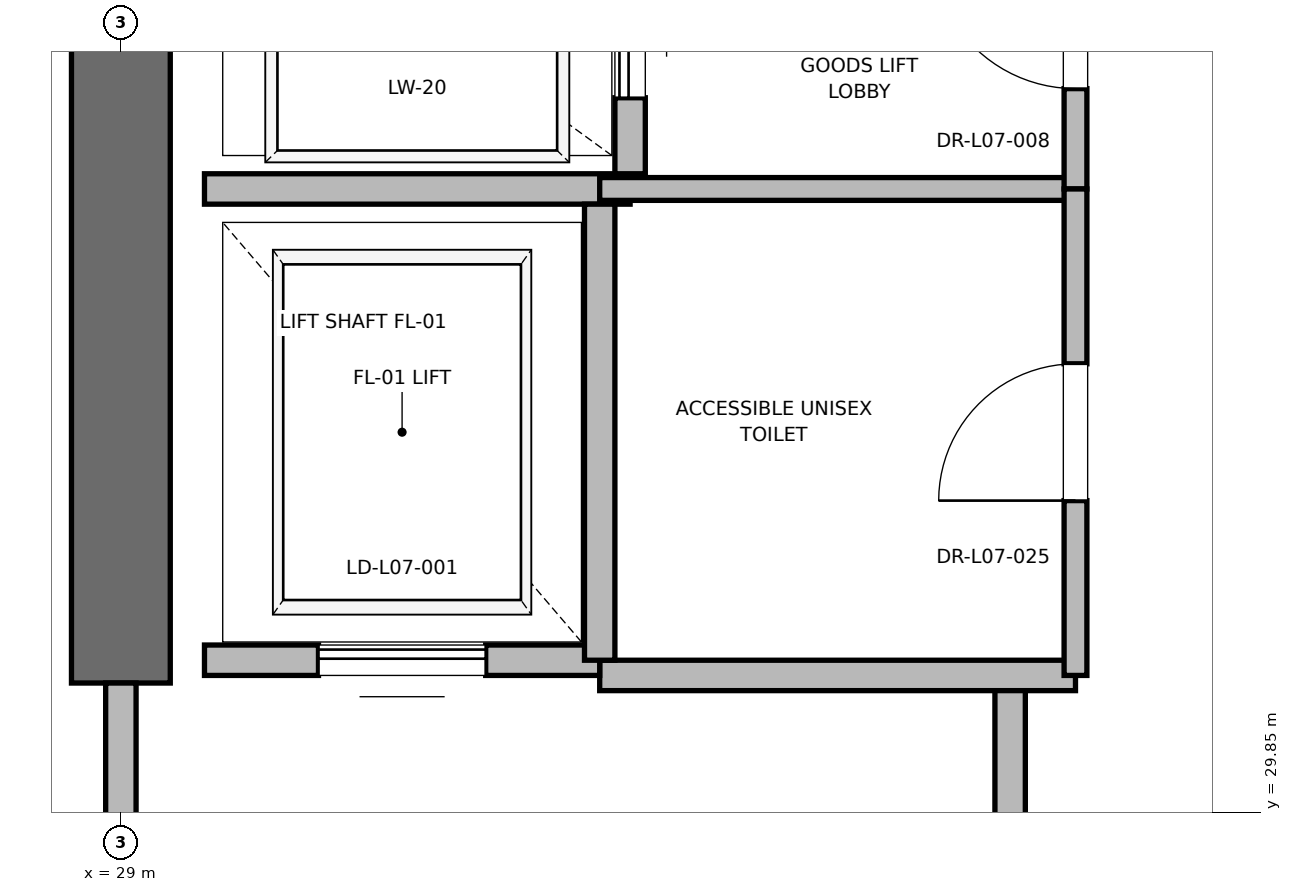
"""IFC4 building model, lengths in metres.
Left out: names, types, materials, properties, quantities, classifications, styles, units other than length and angle.
Written with IfcOpenShell. Run it as: python <this file> out.ifc"""

import sys

from ifc_helpers import new_model, si_unit, direction, frame, frame_2d, origin, place, context, subcontext, project, spatial, rectangle, extrude, element, fill, save


model = new_model("IFC4")
c1 = context("Model", 3, precision=1e-05, world=origin(), true_north=direction((0.0, 1.0)))
c2 = subcontext(c1, "Body", "Model", "MODEL_VIEW")
j1 = project(units=[si_unit("LENGTHUNIT", "METRE"), si_unit("PLANEANGLEUNIT", "RADIAN")], contexts=[c1])
p1 = place(None, origin())
s1 = spatial("IfcSite", under=j1, at=p1, CompositionType="ELEMENT")
p2 = place(p1, origin())
s2 = spatial("IfcBuilding", under=s1, at=p2, CompositionType="ELEMENT")
p3 = place(p2, frame((0.0, 0.0, 35.6)))
s3 = spatial("IfcBuildingStorey", under=s2, at=p3, CompositionType="ELEMENT", Elevation=35.6)
p4 = place(p3, frame((29.0, 30.7, 0.0), z_axis=(0.0, 0.0, 1.0), x_axis=(0.0, 1.0, 0.0)))
e1 = element("IfcWall", 1, at=p4, inside=s3, PredefinedType="SHEAR", context=c2, shape_type="SweptSolid", body=[
    extrude(rectangle(XDim=5.8, YDim=0.65, at=frame_2d((2.9, 0.0))), origin(), (0.0, 0.0, 1.0), 3.76),
])
p5 = place(p3, frame((34.85, 27.38, 0.0), z_axis=(0.0, 0.0, 1.0), x_axis=(0.0, 1.0, 0.0)))
e2 = element("IfcWall", 2, at=p5, inside=s3, PredefinedType="PARTITIONING", context=c2, shape_type="SweptSolid", body=[
    extrude(rectangle(XDim=3.37, YDim=0.2, at=frame_2d((1.685, 0.0))), origin(), (0.0, 0.0, 1.0), 3.76),
])
p6 = place(p5, frame((1.11, 0.0, 0.0)))
e3 = element("IfcOpeningElement", 3, at=p6, cuts=e2, PredefinedType="OPENING", context=c2, shape_type="SweptSolid", body=[
    extrude(rectangle(XDim=1.15, YDim=2.2, at=frame_2d((0.575, 1.1))), frame((0.0, 0.1, 0.0), z_axis=(0.0, -1.0, 0.0), x_axis=(1.0, 0.0, 0.0)), (0.0, 0.0, 1.0), 0.2),
])
p7 = place(p3, frame((29.0, 27.3, 0.0), z_axis=(0.0, 0.0, 1.0), x_axis=(0.0, 1.0, 0.0)))
e4 = element("IfcWall", 4, at=p7, inside=s3, PredefinedType="PARTITIONING", context=c2, shape_type="SweptSolid", body=[
    extrude(rectangle(XDim=3.4, YDim=0.2, at=frame_2d((1.7, 0.0))), origin(), (0.0, 0.0, 1.0), 2.54),
])
p8 = place(p7, frame((1.125, 0.0, 0.0)))
e5 = element("IfcOpeningElement", 5, at=p8, cuts=e4, PredefinedType="OPENING", context=c2, shape_type="SweptSolid", body=[
    extrude(rectangle(XDim=1.15, YDim=2.2, at=frame_2d((0.575, 1.1))), frame((0.0, 0.1, 0.0), z_axis=(0.0, -1.0, 0.0), x_axis=(1.0, 0.0, 0.0)), (0.0, 0.0, 1.0), 0.2),
])
p9 = place(p3, frame((32.15, 30.75, 0.0), z_axis=(0.0, 0.0, 1.0), x_axis=(1.0, 0.0, 0.0)))
e6 = element("IfcWall", 6, at=p9, inside=s3, PredefinedType="PARTITIONING", context=c2, shape_type="SweptSolid", body=[
    extrude(rectangle(XDim=3.13, YDim=0.2, at=frame_2d((1.565, 0.0))), origin(), (0.0, 0.0, 1.0), 3.76),
])
p10 = place(p3, frame((29.55, 30.85, 0.0), z_axis=(0.0, 0.0, 1.0), x_axis=(1.0, 0.0, 0.0)))
e7 = element("IfcWall", 7, at=p10, inside=s3, PredefinedType="SOLIDWALL", context=c2, shape_type="SweptSolid", body=[
    extrude(rectangle(XDim=2.6, YDim=0.2, at=frame_2d((1.3, 0.0))), origin(), (0.0, 0.0, 1.0), 2.54),
])
p11 = place(p10, frame((0.75, 0.0, 0.0)))
e8 = element("IfcOpeningElement", 8, at=p11, cuts=e7, PredefinedType="OPENING", context=c2, shape_type="SweptSolid", body=[
    extrude(rectangle(XDim=1.1, YDim=2.2, at=frame_2d((0.55, 1.1))), frame((0.0, 0.1, 0.0), z_axis=(0.0, -1.0, 0.0), x_axis=(1.0, 0.0, 0.0)), (0.0, 0.0, 1.0), 0.2),
])
p12 = place(p3, frame((29.55, 33.95, 0.0), z_axis=(0.0, 0.0, 1.0), x_axis=(1.0, 0.0, 0.0)))
e9 = element("IfcWall", 9, at=p12, inside=s3, PredefinedType="SOLIDWALL", context=c2, shape_type="SweptSolid", body=[
    extrude(rectangle(XDim=2.8, YDim=0.2, at=frame_2d((1.4, 0.0))), origin(), (0.0, 0.0, 1.0), 3.76),
])
p13 = place(p3, frame((32.15, 30.85, 0.0), z_axis=(0.0, 0.0, 1.0), x_axis=(0.0, 1.0, 0.0)))
e10 = element("IfcWall", 10, at=p13, inside=s3, PredefinedType="SOLIDWALL", context=c2, shape_type="SweptSolid", body=[
    extrude(rectangle(XDim=3.0, YDim=0.2, at=frame_2d((1.5, 0.0))), origin(), (0.0, 0.0, 1.0), 3.76),
])
p14 = place(p3, frame((32.35, 34.05, 0.0), z_axis=(0.0, 0.0, 1.0), x_axis=(0.0, 1.0, 0.0)))
e11 = element("IfcWall", 11, at=p14, inside=s3, PredefinedType="SOLIDWALL", context=c2, shape_type="SweptSolid", body=[
    extrude(rectangle(XDim=2.1, YDim=0.2, at=frame_2d((1.05, 0.0))), origin(), (0.0, 0.0, 1.0), 3.76),
])
p15 = place(p14, frame((0.5, 0.0, 0.0)))
e12 = element("IfcOpeningElement", 12, at=p15, cuts=e11, PredefinedType="OPENING", context=c2, shape_type="SweptSolid", body=[
    extrude(rectangle(XDim=1.1, YDim=2.2, at=frame_2d((0.55, 1.1))), frame((0.0, 0.1, 0.0), z_axis=(0.0, -1.0, 0.0), x_axis=(1.0, 0.0, 0.0)), (0.0, 0.0, 1.0), 0.2),
])
p16 = place(p3, frame((32.15, 33.95, 0.0), z_axis=(0.0, 0.0, 1.0), x_axis=(1.0, 0.0, 0.0)))
e13 = element("IfcWall", 13, at=p16, inside=s3, PredefinedType="PARTITIONING", context=c2, shape_type="SweptSolid", body=[
    extrude(rectangle(XDim=3.13, YDim=0.15, at=frame_2d((1.565, 0.0))), origin(), (0.0, 0.0, 1.0), 2.85),
])
p17 = place(p3, frame((35.28, 33.95, 0.0), z_axis=(0.0, 0.0, 1.0), x_axis=(0.0, 1.0, 0.0)))
e14 = element("IfcWall", 14, at=p17, inside=s3, PredefinedType="PARTITIONING", context=c2, shape_type="SweptSolid", body=[
    extrude(rectangle(XDim=2.27, YDim=0.15, at=frame_2d((1.135, 0.0))), origin(), (0.0, 0.0, 1.0), 2.54),
])
p18 = place(p17, frame((0.66, 0.0, 0.0)))
e15 = element("IfcOpeningElement", 15, at=p18, cuts=e14, PredefinedType="OPENING", context=c2, shape_type="SweptSolid", body=[
    extrude(rectangle(XDim=0.95, YDim=2.15, at=frame_2d((0.475, 1.075))), frame((0.0, 0.075, 0.0), z_axis=(0.0, -1.0, 0.0), x_axis=(1.0, 0.0, 0.0)), (0.0, 0.0, 1.0), 0.15),
])
p19 = place(p3, frame((35.28, 30.75, 0.0), z_axis=(0.0, 0.0, 1.0), x_axis=(0.0, 1.0, 0.0)))
e16 = element("IfcWall", 16, at=p19, inside=s3, PredefinedType="PARTITIONING", context=c2, shape_type="SweptSolid", body=[
    extrude(rectangle(XDim=3.2, YDim=0.15, at=frame_2d((1.6, 0.0))), origin(), (0.0, 0.0, 1.0), 2.85),
])
p20 = place(p19, frame((1.15, 0.0, 0.0)))
e17 = element("IfcOpeningElement", 17, at=p20, cuts=e16, PredefinedType="OPENING", context=c2, shape_type="SweptSolid", body=[
    extrude(rectangle(XDim=0.9, YDim=2.1, at=frame_2d((0.45, 1.05))), frame((0.0, 0.075, 0.0), z_axis=(0.0, -1.0, 0.0), x_axis=(1.0, 0.0, 0.0)), (0.0, 0.0, 1.0), 0.15),
])
p21 = place(p11, origin())
e18 = element("IfcDoor", 18, at=p21, inside=s3, OperationType="SLIDING_TO_RIGHT", PredefinedType="DOOR", context=c2, shape_type="SweptSolid", body=[
    extrude(rectangle(XDim=1.1, YDim=2.2, at=frame_2d((0.55, 1.1))), frame((0.0, 0.025, 0.0), z_axis=(0.0, -1.0, 0.0), x_axis=(1.0, 0.0, 0.0)), (0.0, 0.0, 1.0), 0.05),
])
fill(e8, e18)
p22 = place(p15, origin())
e19 = element("IfcDoor", 19, at=p22, inside=s3, OperationType="SLIDING_TO_RIGHT", PredefinedType="DOOR", context=c2, shape_type="SweptSolid", body=[
    extrude(rectangle(XDim=1.1, YDim=2.2, at=frame_2d((0.55, 1.1))), frame((0.0, 0.025, 0.0), z_axis=(0.0, -1.0, 0.0), x_axis=(1.0, 0.0, 0.0)), (0.0, 0.0, 1.0), 0.05),
])
fill(e12, e19)
p23 = place(p18, origin())
e20 = element("IfcDoor", 20, at=p23, inside=s3, OperationType="SINGLE_SWING_RIGHT", PredefinedType="DOOR", context=c2, shape_type="SweptSolid", body=[
    extrude(rectangle(XDim=0.95, YDim=2.15, at=frame_2d((0.475, 1.075))), frame((0.0, 0.025, 0.0), z_axis=(0.0, -1.0, 0.0), x_axis=(1.0, 0.0, 0.0)), (0.0, 0.0, 1.0), 0.05),
])
fill(e15, e20)
p24 = place(p20, origin())
e21 = element("IfcDoor", 21, at=p24, inside=s3, OperationType="SINGLE_SWING_LEFT", PredefinedType="DOOR", context=c2, shape_type="SweptSolid", body=[
    extrude(rectangle(XDim=0.9, YDim=2.1, at=frame_2d((0.45, 1.05))), frame((0.0, 0.025, 0.0), z_axis=(0.0, -1.0, 0.0), x_axis=(1.0, 0.0, 0.0)), (0.0, 0.0, 1.0), 0.05),
])
fill(e17, e21)
save(model, sys.argv[1])
